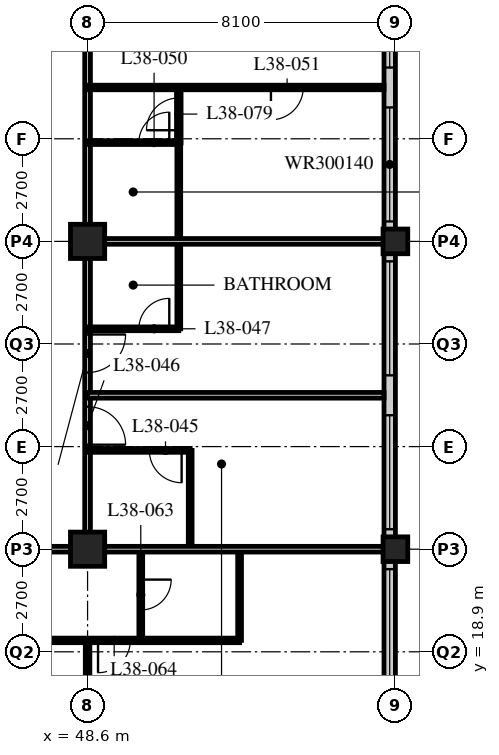
"""IFC4 building model, lengths in metres.
Left out: names, types, materials, properties, quantities, classifications, styles, units other than length and angle.
Written with IfcOpenShell. Run it as: python <this file> out.ifc"""

import sys

from ifc_helpers import new_model, si_unit, direction, frame, frame_2d, origin, origin_2d, place, context, subcontext, project, spatial, rectangle, hollow_rectangle, extrude, element, fill, save


model = new_model("IFC4")
c1 = context("Model", 3, precision=1e-05, world=origin(), true_north=direction((0.0, 1.0)))
c2 = subcontext(c1, "Body", "Model", "MODEL_VIEW")
j1 = project(units=[si_unit("LENGTHUNIT", "METRE"), si_unit("PLANEANGLEUNIT", "RADIAN")], contexts=[c1])
p1 = place(None, origin())
s1 = spatial("IfcSite", under=j1, at=p1, CompositionType="ELEMENT")
p2 = place(p1, origin())
s2 = spatial("IfcBuilding", under=s1, at=p2, CompositionType="ELEMENT")
p3 = place(p2, frame((0.0, 0.0, 147.6)))
s3 = spatial("IfcBuildingStorey", under=s2, at=p3, CompositionType="ELEMENT", Elevation=147.6)
for number, where, z_axis, x_axis in (
    (1, (48.6, 21.6, 0.0), (0.0, 0.0, 1.0), (1.0, 0.0, 0.0)),
    (2, (48.6, 29.7, 0.0), (0.0, 0.0, 1.0), (1.0, 0.0, 0.0)),
):
    element("IfcColumn", number, at=place(p3, frame(where, z_axis=z_axis, x_axis=x_axis)), inside=s3, PredefinedType="COLUMN", context=c2, shape_type="SweptSolid", body=[
        extrude(hollow_rectangle(XDim=0.9, YDim=0.9, WallThickness=0.1, at=origin_2d()), origin(), (0.0, 0.0, 1.0), 3.4),
    ])
for number, where, z_axis, x_axis in (
    (3, (56.7, 21.6, 0.0), (0.0, 0.0, 1.0), (1.0, 0.0, 0.0)),
    (4, (56.7, 29.7, 0.0), (0.0, 0.0, 1.0), (1.0, 0.0, 0.0)),
):
    element("IfcColumn", number, at=place(p3, frame(where, z_axis=z_axis, x_axis=x_axis)), inside=s3, PredefinedType="COLUMN", context=c2, shape_type="SweptSolid", body=[
        extrude(hollow_rectangle(XDim=0.65, YDim=0.65, WallThickness=0.055, at=origin_2d()), origin(), (0.0, 0.0, 1.0), 3.4),
    ])
p4 = place(p3, frame((56.55, 13.8, 0.0), z_axis=(0.0, 0.0, 1.0), x_axis=(0.0, 1.0, 0.0)))
e5 = element("IfcWall", 5, at=p4, inside=s3, PredefinedType="SOLIDWALL", context=c2, shape_type="SweptSolid", body=[
    extrude(rectangle(XDim=32.1, YDim=0.3, at=frame_2d((16.05, 0.0))), origin(), (0.0, 0.0, 1.0), 3.19),
])
p5 = place(p4, frame((0.225, 0.0, 0.9)))
e6 = element("IfcOpeningElement", 6, at=p5, cuts=e5, PredefinedType="OPENING", context=c2, shape_type="SweptSolid", body=[
    extrude(rectangle(XDim=3.0, YDim=1.4, at=frame_2d((1.5, 0.7))), frame((0.0, 0.16, 0.0), z_axis=(0.0, -1.0, 0.0), x_axis=(1.0, 0.0, 0.0)), (0.0, 0.0, 1.0), 0.32),
])
p6 = place(p4, frame((4.275, 0.0, 0.9)))
e7 = element("IfcOpeningElement", 7, at=p6, cuts=e5, PredefinedType="OPENING", context=c2, shape_type="SweptSolid", body=[
    extrude(rectangle(XDim=3.0, YDim=1.4, at=frame_2d((1.5, 0.7))), frame((0.0, 0.16, 0.0), z_axis=(0.0, -1.0, 0.0), x_axis=(1.0, 0.0, 0.0)), (0.0, 0.0, 1.0), 0.32),
])
p7 = place(p4, frame((8.325, 0.0, 0.9)))
e8 = element("IfcOpeningElement", 8, at=p7, cuts=e5, PredefinedType="OPENING", context=c2, shape_type="SweptSolid", body=[
    extrude(rectangle(XDim=3.0, YDim=1.4, at=frame_2d((1.5, 0.7))), frame((0.0, 0.16, 0.0), z_axis=(0.0, -1.0, 0.0), x_axis=(1.0, 0.0, 0.0)), (0.0, 0.0, 1.0), 0.32),
])
p8 = place(p4, frame((12.375, 0.0, 0.9)))
e9 = element("IfcOpeningElement", 9, at=p8, cuts=e5, PredefinedType="OPENING", context=c2, shape_type="SweptSolid", body=[
    extrude(rectangle(XDim=3.0, YDim=1.4, at=frame_2d((1.5, 0.7))), frame((0.0, 0.16, 0.0), z_axis=(0.0, -1.0, 0.0), x_axis=(1.0, 0.0, 0.0)), (0.0, 0.0, 1.0), 0.32),
])
p9 = place(p4, frame((16.425, 0.0, 0.9)))
e10 = element("IfcOpeningElement", 10, at=p9, cuts=e5, PredefinedType="OPENING", context=c2, shape_type="SweptSolid", body=[
    extrude(rectangle(XDim=3.0, YDim=1.4, at=frame_2d((1.5, 0.7))), frame((0.0, 0.16, 0.0), z_axis=(0.0, -1.0, 0.0), x_axis=(1.0, 0.0, 0.0)), (0.0, 0.0, 1.0), 0.32),
])
p10 = place(p4, frame((20.475, 0.0, 0.9)))
e11 = element("IfcOpeningElement", 11, at=p10, cuts=e5, PredefinedType="OPENING", context=c2, shape_type="SweptSolid", body=[
    extrude(rectangle(XDim=3.0, YDim=1.4, at=frame_2d((1.5, 0.7))), frame((0.0, 0.16, 0.0), z_axis=(0.0, -1.0, 0.0), x_axis=(1.0, 0.0, 0.0)), (0.0, 0.0, 1.0), 0.32),
])
p11 = place(p4, frame((24.525, 0.0, 0.9)))
e12 = element("IfcOpeningElement", 12, at=p11, cuts=e5, PredefinedType="OPENING", context=c2, shape_type="SweptSolid", body=[
    extrude(rectangle(XDim=3.0, YDim=1.4, at=frame_2d((1.5, 0.7))), frame((0.0, 0.16, 0.0), z_axis=(0.0, -1.0, 0.0), x_axis=(1.0, 0.0, 0.0)), (0.0, 0.0, 1.0), 0.32),
])
p12 = place(p4, frame((28.575, 0.0, 0.9)))
e13 = element("IfcOpeningElement", 13, at=p12, cuts=e5, PredefinedType="OPENING", context=c2, shape_type="SweptSolid", body=[
    extrude(rectangle(XDim=3.0, YDim=1.4, at=frame_2d((1.5, 0.7))), frame((0.0, 0.16, 0.0), z_axis=(0.0, -1.0, 0.0), x_axis=(1.0, 0.0, 0.0)), (0.0, 0.0, 1.0), 0.32),
])
p13 = place(p3, frame((12.15, 21.6, 0.0), z_axis=(0.0, 0.0, 1.0), x_axis=(1.0, 0.0, 0.0)))
e14 = element("IfcWall", 14, at=p13, inside=s3, PredefinedType="PARTITIONING", context=c2, shape_type="SweptSolid", body=[
    extrude(rectangle(XDim=36.45, YDim=0.15, at=frame_2d((18.225, 0.0))), origin(), (0.0, 0.0, 1.0), 2.42),
])
p14 = place(p13, frame((5.95, 0.0, 0.0)))
e15 = element("IfcOpeningElement", 15, at=p14, cuts=e14, PredefinedType="OPENING", context=c2, shape_type="SweptSolid", body=[
    extrude(rectangle(XDim=1.0, YDim=2.1, at=frame_2d((0.5, 1.05))), frame((0.0, 0.085, 0.0), z_axis=(0.0, -1.0, 0.0), x_axis=(1.0, 0.0, 0.0)), (0.0, 0.0, 1.0), 0.17),
])
p15 = place(p13, frame((14.05, 0.0, 0.0)))
e16 = element("IfcOpeningElement", 16, at=p15, cuts=e14, PredefinedType="OPENING", context=c2, shape_type="SweptSolid", body=[
    extrude(rectangle(XDim=1.0, YDim=2.1, at=frame_2d((0.5, 1.05))), frame((0.0, 0.085, 0.0), z_axis=(0.0, -1.0, 0.0), x_axis=(1.0, 0.0, 0.0)), (0.0, 0.0, 1.0), 0.17),
])
p16 = place(p13, frame((22.15, 0.0, 0.0)))
e17 = element("IfcOpeningElement", 17, at=p16, cuts=e14, PredefinedType="OPENING", context=c2, shape_type="SweptSolid", body=[
    extrude(rectangle(XDim=1.0, YDim=2.1, at=frame_2d((0.5, 1.05))), frame((0.0, 0.085, 0.0), z_axis=(0.0, -1.0, 0.0), x_axis=(1.0, 0.0, 0.0)), (0.0, 0.0, 1.0), 0.17),
])
p17 = place(p13, frame((30.8, 0.0, 0.0)))
e18 = element("IfcOpeningElement", 18, at=p17, cuts=e14, PredefinedType="OPENING", context=c2, shape_type="SweptSolid", body=[
    extrude(rectangle(XDim=1.0, YDim=2.1, at=frame_2d((0.5, 1.05))), frame((0.0, 0.085, 0.0), z_axis=(0.0, -1.0, 0.0), x_axis=(1.0, 0.0, 0.0)), (0.0, 0.0, 1.0), 0.17),
])
p18 = place(p13, frame((1.525, 0.0, 0.0)))
e19 = element("IfcOpeningElement", 19, at=p18, cuts=e14, PredefinedType="OPENING", context=c2, shape_type="SweptSolid", body=[
    extrude(rectangle(XDim=1.0, YDim=2.1, at=frame_2d((0.5, 1.05))), frame((0.0, 0.085, 0.0), z_axis=(0.0, -1.0, 0.0), x_axis=(1.0, 0.0, 0.0)), (0.0, 0.0, 1.0), 0.17),
])
p19 = place(p13, frame((33.925, 0.0, 0.0)))
e20 = element("IfcOpeningElement", 20, at=p19, cuts=e14, PredefinedType="OPENING", context=c2, shape_type="SweptSolid", body=[
    extrude(rectangle(XDim=1.0, YDim=2.1, at=frame_2d((0.5, 1.05))), frame((0.0, 0.085, 0.0), z_axis=(0.0, -1.0, 0.0), x_axis=(1.0, 0.0, 0.0)), (0.0, 0.0, 1.0), 0.17),
])
p20 = place(p3, frame((48.6, 21.6, 0.0), z_axis=(0.0, 0.0, 1.0), x_axis=(0.0, 1.0, 0.0)))
e21 = element("IfcWall", 21, at=p20, inside=s3, PredefinedType="PARTITIONING", context=c2, shape_type="SweptSolid", body=[
    extrude(rectangle(XDim=24.3, YDim=0.15, at=frame_2d((12.15, 0.0))), origin(), (0.0, 0.0, 1.0), 2.42),
])
p21 = place(p20, frame((2.75, 0.0, 0.0)))
e22 = element("IfcOpeningElement", 22, at=p21, cuts=e21, PredefinedType="OPENING", context=c2, shape_type="SweptSolid", body=[
    extrude(rectangle(XDim=1.0, YDim=2.1, at=frame_2d((0.5, 1.05))), frame((0.0, 0.085, 0.0), z_axis=(0.0, -1.0, 0.0), x_axis=(1.0, 0.0, 0.0)), (0.0, 0.0, 1.0), 0.17),
])
p22 = place(p20, frame((4.65, 0.0, 0.0)))
e23 = element("IfcOpeningElement", 23, at=p22, cuts=e21, PredefinedType="OPENING", context=c2, shape_type="SweptSolid", body=[
    extrude(rectangle(XDim=1.0, YDim=2.1, at=frame_2d((0.5, 1.05))), frame((0.0, 0.085, 0.0), z_axis=(0.0, -1.0, 0.0), x_axis=(1.0, 0.0, 0.0)), (0.0, 0.0, 1.0), 0.17),
])
p23 = place(p20, frame((13.675, 0.0, 0.0)))
e24 = element("IfcOpeningElement", 24, at=p23, cuts=e21, PredefinedType="OPENING", context=c2, shape_type="SweptSolid", body=[
    extrude(rectangle(XDim=1.0, YDim=2.1, at=frame_2d((0.5, 1.05))), frame((0.0, 0.085, 0.0), z_axis=(0.0, -1.0, 0.0), x_axis=(1.0, 0.0, 0.0)), (0.0, 0.0, 1.0), 0.17),
])
p24 = place(p20, frame((20.85, 0.0, 0.0)))
e25 = element("IfcOpeningElement", 25, at=p24, cuts=e21, PredefinedType="OPENING", context=c2, shape_type="SweptSolid", body=[
    extrude(rectangle(XDim=1.0, YDim=2.1, at=frame_2d((0.5, 1.05))), frame((0.0, 0.085, 0.0), z_axis=(0.0, -1.0, 0.0), x_axis=(1.0, 0.0, 0.0)), (0.0, 0.0, 1.0), 0.17),
])
p25 = place(p3, frame((51.3, 21.6, 0.0), z_axis=(0.0, 0.0, 1.0), x_axis=(0.0, 1.0, 0.0)))
e26 = element("IfcWall", 26, at=p25, inside=s3, PredefinedType="PARTITIONING", context=c2, shape_type="SweptSolid", body=[
    extrude(rectangle(XDim=2.6, YDim=0.1, at=frame_2d((1.3, 0.0))), origin(), (0.0, 0.0, 1.0), 3.19),
])
p26 = place(p3, frame((48.6, 24.2, 0.0), z_axis=(0.0, 0.0, 1.0), x_axis=(1.0, 0.0, 0.0)))
e27 = element("IfcWall", 27, at=p26, inside=s3, PredefinedType="PARTITIONING", context=c2, shape_type="SweptSolid", body=[
    extrude(rectangle(XDim=2.7, YDim=0.1, at=frame_2d((1.35, 0.0))), origin(), (0.0, 0.0, 1.0), 3.19),
])
p27 = place(p26, frame((1.625, 0.0, 0.0)))
e28 = element("IfcOpeningElement", 28, at=p27, cuts=e27, PredefinedType="OPENING", context=c2, shape_type="SweptSolid", body=[
    extrude(rectangle(XDim=0.85, YDim=2.1, at=frame_2d((0.425, 1.05))), frame((0.0, 0.06, 0.0), z_axis=(0.0, -1.0, 0.0), x_axis=(1.0, 0.0, 0.0)), (0.0, 0.0, 1.0), 0.12),
])
p28 = place(p3, frame((48.6, 25.65, 0.0), z_axis=(0.0, 0.0, 1.0), x_axis=(1.0, 0.0, 0.0)))
e29 = element("IfcWall", 29, at=p28, inside=s3, PredefinedType="PARTITIONING", context=c2, shape_type="SweptSolid", body=[
    extrude(rectangle(XDim=7.8, YDim=0.15, at=frame_2d((3.9, 0.0))), origin(), (0.0, 0.0, 1.0), 3.19),
])
p29 = place(p3, frame((51.0, 27.4, 0.0), z_axis=(0.0, 0.0, 1.0), x_axis=(0.0, 1.0, 0.0)))
e30 = element("IfcWall", 30, at=p29, inside=s3, PredefinedType="PARTITIONING", context=c2, shape_type="SweptSolid", body=[
    extrude(rectangle(XDim=4.9, YDim=0.1, at=frame_2d((2.45, 0.0))), origin(), (0.0, 0.0, 1.0), 3.19),
])
p30 = place(p3, frame((48.6, 27.4, 0.0), z_axis=(0.0, 0.0, 1.0), x_axis=(1.0, 0.0, 0.0)))
e31 = element("IfcWall", 31, at=p30, inside=s3, PredefinedType="PARTITIONING", context=c2, shape_type="SweptSolid", body=[
    extrude(rectangle(XDim=2.4, YDim=0.1, at=frame_2d((1.2, 0.0))), origin(), (0.0, 0.0, 1.0), 3.19),
])
p31 = place(p30, frame((1.35, 0.0, 0.0)))
e32 = element("IfcOpeningElement", 32, at=p31, cuts=e31, PredefinedType="OPENING", context=c2, shape_type="SweptSolid", body=[
    extrude(rectangle(XDim=0.8, YDim=2.1, at=frame_2d((0.4, 1.05))), frame((0.0, 0.06, 0.0), z_axis=(0.0, -1.0, 0.0), x_axis=(1.0, 0.0, 0.0)), (0.0, 0.0, 1.0), 0.12),
])
p32 = place(p3, frame((48.6, 29.7, 0.0), z_axis=(0.0, 0.0, 1.0), x_axis=(1.0, 0.0, 0.0)))
e33 = element("IfcWall", 33, at=p32, inside=s3, PredefinedType="PARTITIONING", context=c2, shape_type="SweptSolid", body=[
    extrude(rectangle(XDim=7.8, YDim=0.15, at=frame_2d((3.9, 0.0))), origin(), (0.0, 0.0, 1.0), 2.42),
])
p33 = place(p3, frame((48.6, 32.3, 0.0), z_axis=(0.0, 0.0, 1.0), x_axis=(1.0, 0.0, 0.0)))
e34 = element("IfcWall", 34, at=p33, inside=s3, PredefinedType="PARTITIONING", context=c2, shape_type="SweptSolid", body=[
    extrude(rectangle(XDim=2.4, YDim=0.1, at=frame_2d((1.2, 0.0))), origin(), (0.0, 0.0, 1.0), 3.19),
])
p34 = place(p33, frame((1.35, 0.0, 0.0)))
e35 = element("IfcOpeningElement", 35, at=p34, cuts=e34, PredefinedType="OPENING", context=c2, shape_type="SweptSolid", body=[
    extrude(rectangle(XDim=0.8, YDim=2.1, at=frame_2d((0.4, 1.05))), frame((0.0, 0.06, 0.0), z_axis=(0.0, -1.0, 0.0), x_axis=(1.0, 0.0, 0.0)), (0.0, 0.0, 1.0), 0.12),
])
p35 = place(p3, frame((48.6, 33.75, 0.0), z_axis=(0.0, 0.0, 1.0), x_axis=(1.0, 0.0, 0.0)))
e36 = element("IfcWall", 36, at=p35, inside=s3, PredefinedType="PARTITIONING", context=c2, shape_type="SweptSolid", body=[
    extrude(rectangle(XDim=7.8, YDim=0.12, at=frame_2d((3.9, 0.0))), origin(), (0.0, 0.0, 1.0), 3.19),
])
p36 = place(p35, frame((4.825, 0.0, 0.0)))
e37 = element("IfcOpeningElement", 37, at=p36, cuts=e36, PredefinedType="OPENING", context=c2, shape_type="SweptSolid", body=[
    extrude(rectangle(XDim=0.85, YDim=2.1, at=frame_2d((0.425, 1.05))), frame((0.0, 0.07, 0.0), z_axis=(0.0, -1.0, 0.0), x_axis=(1.0, 0.0, 0.0)), (0.0, 0.0, 1.0), 0.14),
])
p37 = place(p3, frame((44.55, 19.2, 0.0), z_axis=(0.0, 0.0, 1.0), x_axis=(1.0, 0.0, 0.0)))
e38 = element("IfcWall", 38, at=p37, inside=s3, PredefinedType="PARTITIONING", context=c2, shape_type="SweptSolid", body=[
    extrude(rectangle(XDim=8.05, YDim=0.12, at=frame_2d((4.025, 0.0))), origin(), (0.0, 0.0, 1.0), 3.19),
])
p38 = place(p37, frame((0.475, 0.0, 0.0)))
e39 = element("IfcOpeningElement", 39, at=p38, cuts=e38, PredefinedType="OPENING", context=c2, shape_type="SweptSolid", body=[
    extrude(rectangle(XDim=0.85, YDim=2.1, at=frame_2d((0.425, 1.05))), frame((0.0, 0.07, 0.0), z_axis=(0.0, -1.0, 0.0), x_axis=(1.0, 0.0, 0.0)), (0.0, 0.0, 1.0), 0.14),
])
p39 = place(p37, frame((4.325, 0.0, 0.0)))
e40 = element("IfcOpeningElement", 40, at=p39, cuts=e38, PredefinedType="OPENING", context=c2, shape_type="SweptSolid", body=[
    extrude(rectangle(XDim=0.85, YDim=2.1, at=frame_2d((0.425, 1.05))), frame((0.0, 0.07, 0.0), z_axis=(0.0, -1.0, 0.0), x_axis=(1.0, 0.0, 0.0)), (0.0, 0.0, 1.0), 0.14),
])
p40 = place(p3, frame((50.0, 21.6, 0.0), z_axis=(0.0, 0.0, 1.0), x_axis=(0.0, -1.0, 0.0)))
e41 = element("IfcWall", 41, at=p40, inside=s3, PredefinedType="PARTITIONING", context=c2, shape_type="SweptSolid", body=[
    extrude(rectangle(XDim=2.4, YDim=0.1, at=frame_2d((1.2, 0.0))), origin(), (0.0, 0.0, 1.0), 3.19),
])
p41 = place(p40, frame((0.8, 0.0, 0.0)))
e42 = element("IfcOpeningElement", 42, at=p41, cuts=e41, PredefinedType="OPENING", context=c2, shape_type="SweptSolid", body=[
    extrude(rectangle(XDim=0.8, YDim=2.1, at=frame_2d((0.4, 1.05))), frame((0.0, 0.06, 0.0), z_axis=(0.0, -1.0, 0.0), x_axis=(1.0, 0.0, 0.0)), (0.0, 0.0, 1.0), 0.12),
])
p42 = place(p3, frame((52.6, 21.6, 0.0), z_axis=(0.0, 0.0, 1.0), x_axis=(0.0, -1.0, 0.0)))
e43 = element("IfcWall", 43, at=p42, inside=s3, PredefinedType="PARTITIONING", context=c2, shape_type="SweptSolid", body=[
    extrude(rectangle(XDim=2.4, YDim=0.1, at=frame_2d((1.2, 0.0))), origin(), (0.0, 0.0, 1.0), 3.19),
])
p43 = place(p3, frame((48.6, 19.2, 0.0), z_axis=(0.0, 0.0, 1.0), x_axis=(0.0, -1.0, 0.0)))
e44 = element("IfcWall", 44, at=p43, inside=s3, PredefinedType="PARTITIONING", context=c2, shape_type="SweptSolid", body=[
    extrude(rectangle(XDim=9.45, YDim=0.12, at=frame_2d((4.725, 0.0))), origin(), (0.0, 0.0, 1.0), 2.42),
])
p44 = place(p3, frame((48.6, 21.6, 0.0), z_axis=(0.0, 0.0, 1.0), x_axis=(1.0, 0.0, 0.0)))
e45 = element("IfcWall", 45, at=p44, inside=s3, PredefinedType="PARTITIONING", context=c2, shape_type="SweptSolid", body=[
    extrude(rectangle(XDim=7.8, YDim=0.15, at=frame_2d((3.9, 0.0))), origin(), (0.0, 0.0, 1.0), 2.42),
])
p45 = place(p3, frame((51.0, 33.75, 0.0), z_axis=(0.0, 0.0, 1.0), x_axis=(0.0, -1.0, 0.0)))
e46 = element("IfcWall", 46, at=p45, inside=s3, PredefinedType="PARTITIONING", context=c2, shape_type="SweptSolid", body=[
    extrude(rectangle(XDim=1.46, YDim=0.12, at=frame_2d((0.73, 0.0))), origin(), (0.0, 0.0, 1.0), 3.19),
])
p46 = place(p45, frame((0.275, 0.0, 0.0)))
e47 = element("IfcOpeningElement", 47, at=p46, cuts=e46, PredefinedType="OPENING", context=c2, shape_type="SweptSolid", body=[
    extrude(rectangle(XDim=0.85, YDim=2.1, at=frame_2d((0.425, 1.05))), frame((0.0, 0.07, 0.0), z_axis=(0.0, -1.0, 0.0), x_axis=(1.0, 0.0, 0.0)), (0.0, 0.0, 1.0), 0.14),
])
p47 = place(p6, origin())
e48 = element("IfcWindow", 48, at=p47, inside=s3, PartitioningType="SINGLE_PANEL", PredefinedType="WINDOW", context=c2, shape_type="SweptSolid", body=[
    extrude(rectangle(XDim=3.0, YDim=1.4, at=frame_2d((1.5, 0.7))), frame((0.0, 0.03, 0.0), z_axis=(0.0, -1.0, 0.0), x_axis=(1.0, 0.0, 0.0)), (0.0, 0.0, 1.0), 0.06),
])
fill(e7, e48)
p48 = place(p7, origin())
e49 = element("IfcWindow", 49, at=p48, inside=s3, PartitioningType="SINGLE_PANEL", PredefinedType="WINDOW", context=c2, shape_type="SweptSolid", body=[
    extrude(rectangle(XDim=3.0, YDim=1.4, at=frame_2d((1.5, 0.7))), frame((0.0, 0.03, 0.0), z_axis=(0.0, -1.0, 0.0), x_axis=(1.0, 0.0, 0.0)), (0.0, 0.0, 1.0), 0.06),
])
fill(e8, e49)
p49 = place(p8, origin())
e50 = element("IfcWindow", 50, at=p49, inside=s3, PartitioningType="SINGLE_PANEL", PredefinedType="WINDOW", context=c2, shape_type="SweptSolid", body=[
    extrude(rectangle(XDim=3.0, YDim=1.4, at=frame_2d((1.5, 0.7))), frame((0.0, 0.03, 0.0), z_axis=(0.0, -1.0, 0.0), x_axis=(1.0, 0.0, 0.0)), (0.0, 0.0, 1.0), 0.06),
])
fill(e9, e50)
p50 = place(p9, origin())
e51 = element("IfcWindow", 51, at=p50, inside=s3, PartitioningType="SINGLE_PANEL", PredefinedType="WINDOW", context=c2, shape_type="SweptSolid", body=[
    extrude(rectangle(XDim=3.0, YDim=1.4, at=frame_2d((1.5, 0.7))), frame((0.0, 0.03, 0.0), z_axis=(0.0, -1.0, 0.0), x_axis=(1.0, 0.0, 0.0)), (0.0, 0.0, 1.0), 0.06),
])
fill(e10, e51)
p51 = place(p10, origin())
e52 = element("IfcWindow", 52, at=p51, inside=s3, PartitioningType="SINGLE_PANEL", PredefinedType="WINDOW", context=c2, shape_type="SweptSolid", body=[
    extrude(rectangle(XDim=3.0, YDim=1.4, at=frame_2d((1.5, 0.7))), frame((0.0, 0.03, 0.0), z_axis=(0.0, -1.0, 0.0), x_axis=(1.0, 0.0, 0.0)), (0.0, 0.0, 1.0), 0.06),
])
fill(e11, e52)
p52 = place(p27, origin())
e53 = element("IfcDoor", 53, at=p52, inside=s3, OperationType="SINGLE_SWING_LEFT", PredefinedType="DOOR", context=c2, shape_type="SweptSolid", body=[
    extrude(rectangle(XDim=0.85, YDim=2.1, at=frame_2d((0.425, 1.05))), frame((0.0, 0.025, 0.0), z_axis=(0.0, -1.0, 0.0), x_axis=(1.0, 0.0, 0.0)), (0.0, 0.0, 1.0), 0.05),
])
fill(e28, e53)
p53 = place(p21, origin())
e54 = element("IfcDoor", 54, at=p53, inside=s3, OperationType="SINGLE_SWING_RIGHT", PredefinedType="DOOR", context=c2, shape_type="SweptSolid", body=[
    extrude(rectangle(XDim=1.0, YDim=2.1, at=frame_2d((0.5, 1.05))), frame((0.0, 0.025, 0.0), z_axis=(0.0, -1.0, 0.0), x_axis=(1.0, 0.0, 0.0)), (0.0, 0.0, 1.0), 0.05),
])
fill(e22, e54)
p54 = place(p31, origin())
e55 = element("IfcDoor", 55, at=p54, inside=s3, OperationType="SINGLE_SWING_RIGHT", PredefinedType="DOOR", context=c2, shape_type="SweptSolid", body=[
    extrude(rectangle(XDim=0.8, YDim=2.1, at=frame_2d((0.4, 1.05))), frame((0.0, 0.025, 0.0), z_axis=(0.0, -1.0, 0.0), x_axis=(1.0, 0.0, 0.0)), (0.0, 0.0, 1.0), 0.05),
])
fill(e32, e55)
p55 = place(p22, origin())
e56 = element("IfcDoor", 56, at=p55, inside=s3, OperationType="SINGLE_SWING_LEFT", PredefinedType="DOOR", context=c2, shape_type="SweptSolid", body=[
    extrude(rectangle(XDim=1.0, YDim=2.1, at=frame_2d((0.5, 1.05))), frame((0.0, 0.025, 0.0), z_axis=(0.0, -1.0, 0.0), x_axis=(1.0, 0.0, 0.0)), (0.0, 0.0, 1.0), 0.05),
])
fill(e23, e56)
p56 = place(p34, origin())
e57 = element("IfcDoor", 57, at=p56, inside=s3, OperationType="SINGLE_SWING_RIGHT", PredefinedType="DOOR", context=c2, shape_type="SweptSolid", body=[
    extrude(rectangle(XDim=0.8, YDim=2.1, at=frame_2d((0.4, 1.05))), frame((0.0, 0.025, 0.0), z_axis=(0.0, -1.0, 0.0), x_axis=(1.0, 0.0, 0.0)), (0.0, 0.0, 1.0), 0.05),
])
fill(e35, e57)
p57 = place(p36, origin())
e58 = element("IfcDoor", 58, at=p57, inside=s3, OperationType="SINGLE_SWING_RIGHT", PredefinedType="DOOR", context=c2, shape_type="SweptSolid", body=[
    extrude(rectangle(XDim=0.85, YDim=2.1, at=frame_2d((0.425, 1.05))), frame((0.0, 0.025, 0.0), z_axis=(0.0, -1.0, 0.0), x_axis=(1.0, 0.0, 0.0)), (0.0, 0.0, 1.0), 0.05),
])
fill(e37, e58)
p58 = place(p41, origin())
e59 = element("IfcDoor", 59, at=p58, inside=s3, OperationType="SINGLE_SWING_LEFT", PredefinedType="DOOR", context=c2, shape_type="SweptSolid", body=[
    extrude(rectangle(XDim=0.8, YDim=2.1, at=frame_2d((0.4, 1.05))), frame((0.0, 0.025, 0.0), z_axis=(0.0, -1.0, 0.0), x_axis=(1.0, 0.0, 0.0)), (0.0, 0.0, 1.0), 0.05),
])
fill(e42, e59)
p59 = place(p39, origin())
e60 = element("IfcDoor", 60, at=p59, inside=s3, OperationType="SINGLE_SWING_RIGHT", PredefinedType="DOOR", context=c2, shape_type="SweptSolid", body=[
    extrude(rectangle(XDim=0.85, YDim=2.1, at=frame_2d((0.425, 1.05))), frame((0.0, 0.025, 0.0), z_axis=(0.0, -1.0, 0.0), x_axis=(1.0, 0.0, 0.0)), (0.0, 0.0, 1.0), 0.05),
])
fill(e40, e60)
p60 = place(p46, origin())
e61 = element("IfcDoor", 61, at=p60, inside=s3, OperationType="SINGLE_SWING_LEFT", PredefinedType="DOOR", context=c2, shape_type="SweptSolid", body=[
    extrude(rectangle(XDim=0.85, YDim=2.1, at=frame_2d((0.425, 1.05))), frame((0.0, 0.025, 0.0), z_axis=(0.0, -1.0, 0.0), x_axis=(1.0, 0.0, 0.0)), (0.0, 0.0, 1.0), 0.05),
])
fill(e47, e61)
save(model, sys.argv[1])
